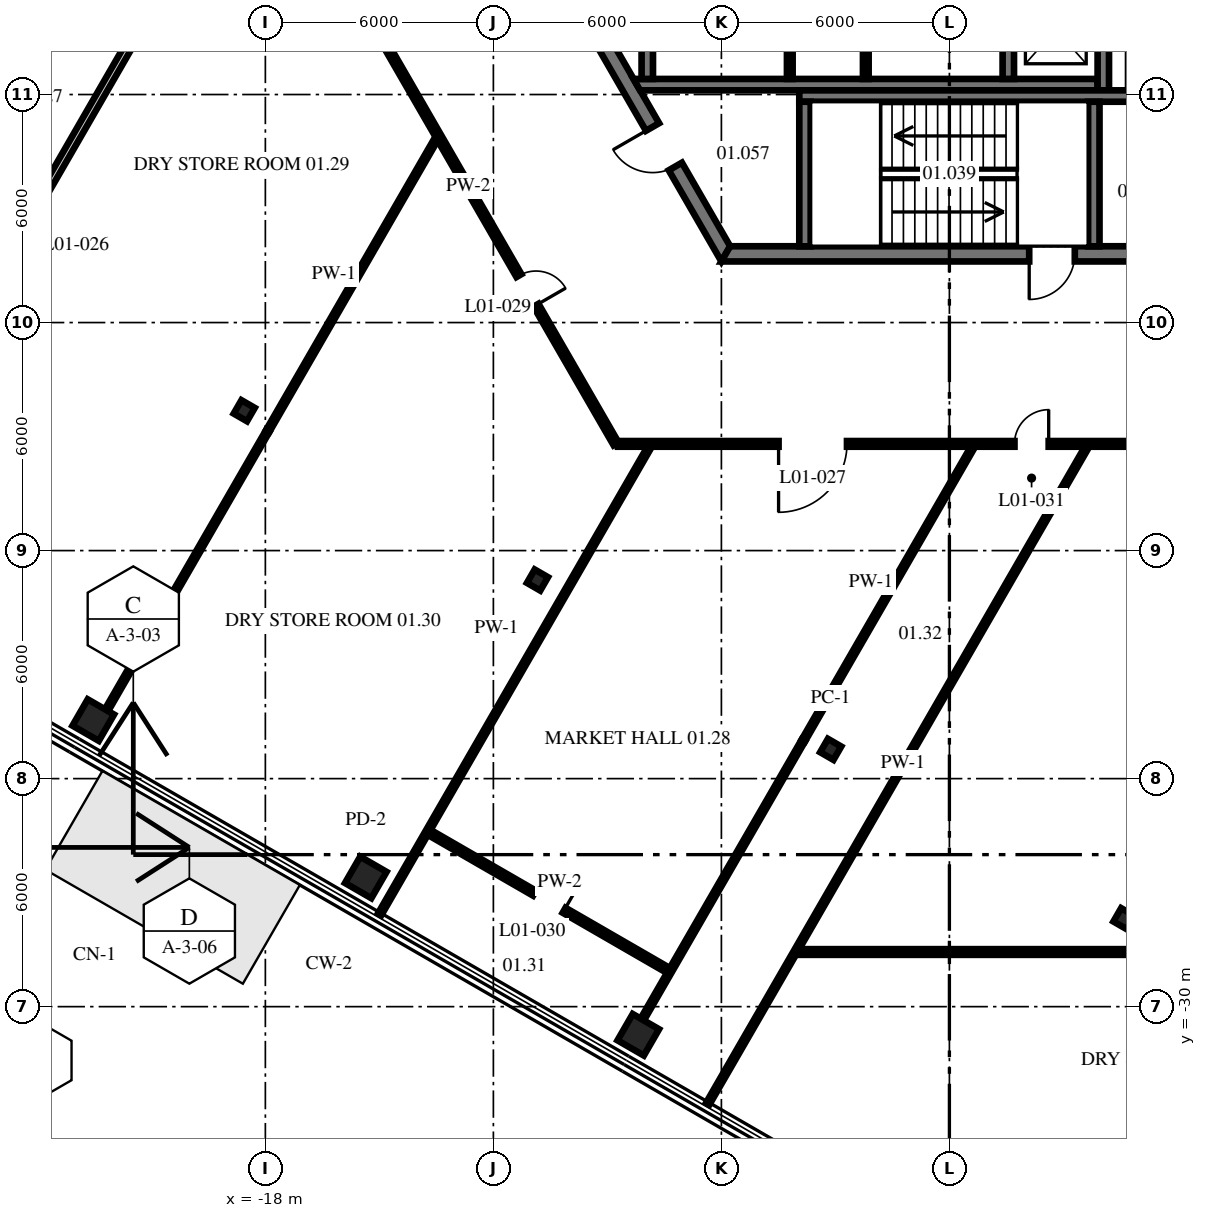
"""IFC4 building model, lengths in metres.
Left out: names, types, materials, properties, quantities, classifications, styles, units other than length and angle.
Written with IfcOpenShell. Run it as: python <this file> out.ifc"""

import sys

from ifc_helpers import new_model, si_unit, direction, frame, frame_2d, origin, origin_2d, place, context, subcontext, project, spatial, polyline, rectangle, i_section, outline, extrude, source, transform, mapped, element, fill, save


model = new_model("IFC4")
c1 = context("Model", 3, precision=1e-05, world=origin(), true_north=direction((0.0, 1.0)))
c2 = subcontext(c1, "Body", "Model", "MODEL_VIEW")
j1 = project(units=[si_unit("LENGTHUNIT", "METRE"), si_unit("PLANEANGLEUNIT", "RADIAN")], contexts=[c1])
p1 = place(None, origin())
s1 = spatial("IfcSite", under=j1, at=p1, CompositionType="ELEMENT")
p2 = place(p1, origin())
s2 = spatial("IfcBuilding", under=s1, at=p2, CompositionType="ELEMENT")
p3 = place(p2, frame((0.0, 0.0, 7.0)))
s3 = spatial("IfcBuildingStorey", under=s2, at=p3, CompositionType="ELEMENT", Elevation=7.0)
m1 = source(origin(), c2, "Body", "SweptSolid", [
    extrude(i_section(OverallWidth=0.404, OverallDepth=0.406, WebThickness=0.027, FlangeThickness=0.044, at=origin_2d()), origin(), (0.0, 0.0, 1.0), 4.5),
])
for number, where, z_axis, x_axis in (
    (1, (-18.556, -14.32, 0.0), (0.0, 0.0, 1.0), (0.866, -0.5, 0.0)),
    (2, (-10.84, -18.775, 0.0), (0.0, 0.0, 1.0), (0.866, -0.5, 0.0)),
    (3, (-3.124, -23.23, 0.0), (0.0, 0.0, 1.0), (0.866, -0.5, 0.0)),
    (4, (4.593, -27.685, 0.0), (0.0, 0.0, 1.0), (0.866, -0.5, 0.0)),
):
    element("IfcColumn", number, at=place(p3, frame(where, z_axis=z_axis, x_axis=x_axis)), inside=s3, PredefinedType="COLUMN", context=c2, shape_type="MappedRepresentation", body=[
        mapped(m1, transform((0.0, 0.0, 0.0), scale=1.0)),
    ])
m2 = source(origin(), c2, "Body", "SweptSolid", [
    extrude(rectangle(XDim=0.8, YDim=0.8, at=origin_2d()), origin(), (0.0, 0.0, 1.0), 4.5),
])
for number, where, z_axis, x_axis in (
    (5, (-22.528, -22.46, 0.0), (0.0, 0.0, 1.0), (0.866, -0.5, 0.0)),
    (6, (-15.358, -26.6, 0.0), (0.0, 0.0, 1.0), (0.866, -0.5, 0.0)),
    (7, (-8.187, -30.74, 0.0), (0.0, 0.0, 1.0), (0.866, -0.5, 0.0)),
):
    element("IfcColumn", number, at=place(p3, frame(where, z_axis=z_axis, x_axis=x_axis)), inside=s3, PredefinedType="COLUMN", context=c2, shape_type="MappedRepresentation", body=[
        mapped(m2, transform((0.0, 0.0, 0.0), scale=1.0)),
    ])
m3 = source(origin(), c2, "Body", "SweptSolid", [
    extrude(outline(polyline([(-0.115, -0.2), (11.885, -0.2), (11.654, 0.2), (0.115, 0.2), (-0.115, -0.2)])), origin(), (0.0, 0.0, 1.0), 4.3),
])
p4 = place(p3, frame((-11.769, 0.0, 0.0), z_axis=(0.0, 0.0, 1.0), x_axis=(0.499996592174, -0.866027371285, 0.0)))
e8 = element("IfcWall", 8, at=p4, inside=s3, PredefinedType="SHEAR", context=c2, shape_type="MappedRepresentation", body=[
    mapped(m3, transform((0.0, 0.0, 0.0), scale=1.0)),
])
p5 = place(p4, frame((1.405, 0.0, 0.0)))
e9 = element("IfcOpeningElement", 9, at=p5, cuts=e8, PredefinedType="OPENING", context=c2, shape_type="SweptSolid", body=[
    extrude(rectangle(XDim=1.8, YDim=2.1, at=frame_2d((0.9, 1.05))), frame((0.0, 0.21, 0.0), z_axis=(0.0, -1.0, 0.0), x_axis=(1.0, 0.0, 0.0)), (0.0, 0.0, 1.0), 0.42),
])
p6 = place(p4, frame((7.915, 0.0, 0.0)))
e10 = element("IfcOpeningElement", 10, at=p6, cuts=e8, PredefinedType="OPENING", context=c2, shape_type="SweptSolid", body=[
    extrude(rectangle(XDim=1.2, YDim=2.1, at=frame_2d((0.6, 1.05))), frame((0.0, 0.21, 0.0), z_axis=(0.0, -1.0, 0.0), x_axis=(1.0, 0.0, 0.0)), (0.0, 0.0, 1.0), 0.42),
])
p7 = place(p3, frame((-5.885, -10.192, 0.0), z_axis=(0.0, 0.0, 1.0), x_axis=(1.0, 0.0, 0.0)))
e11 = element("IfcWall", 11, at=p7, inside=s3, PredefinedType="SHEAR", context=c2, shape_type="MappedRepresentation", body=[
    mapped(m3, transform((0.0, 0.0, 0.0), scale=1.0)),
])
p8 = place(p7, frame((7.985, 0.0, 0.0)))
e12 = element("IfcOpeningElement", 12, at=p8, cuts=e11, PredefinedType="OPENING", context=c2, shape_type="SweptSolid", body=[
    extrude(rectangle(XDim=1.2, YDim=2.1, at=frame_2d((0.6, 1.05))), frame((0.0, 0.21, 0.0), z_axis=(0.0, -1.0, 0.0), x_axis=(1.0, 0.0, 0.0)), (0.0, 0.0, 1.0), 0.42),
])
m4 = source(origin(), c2, "Body", "SweptSolid", [
    extrude(outline(polyline([(12.0, -0.15), (-0.04, -0.15), (-0.213, 0.15), (12.0, 0.15), (12.0, -0.15)])), origin(), (0.0, 0.0, 1.0), 4.3),
])
p9 = place(p3, frame((-8.1, -5.74, 0.0), z_axis=(0.0, 0.0, 1.0), x_axis=(1.0, 0.0, 0.0)))
e13 = element("IfcWall", 13, at=p9, inside=s3, PredefinedType="SHEAR", context=c2, shape_type="MappedRepresentation", body=[
    mapped(m4, transform((0.0, 0.0, 0.0), scale=1.0)),
])
m5 = source(origin(), c2, "Body", "SweptSolid", [
    extrude(rectangle(XDim=2.2, YDim=0.3, at=frame_2d((1.1, 0.0))), origin(), (0.0, 0.0, 1.0), 4.3),
])
for number, where, z_axis, x_axis in (
    (14, (-7.95, -5.59, 0.0), (0.0, 0.0, 1.0), (0.0, 1.0, 0.0)),
    (15, (1.55, -5.59, 0.0), (0.0, 0.0, 1.0), (0.0, 1.0, 0.0)),
):
    element("IfcWall", number, at=place(p3, frame(where, z_axis=z_axis, x_axis=x_axis)), inside=s3, PredefinedType="SHEAR", context=c2, shape_type="MappedRepresentation", body=[
        mapped(m5, transform((0.0, 0.0, 0.0), scale=1.0)),
    ])
m6 = source(origin(), c2, "Body", "SweptSolid", [
    extrude(rectangle(XDim=2.5, YDim=0.3, at=frame_2d((1.25, 0.0))), origin(), (0.0, 0.0, 1.0), 4.3),
])
p10 = place(p3, frame((4.05, -5.89, 0.0), z_axis=(0.0, 0.0, 1.0), x_axis=(0.0, 1.0, 0.0)))
e16 = element("IfcWall", 16, at=p10, inside=s3, PredefinedType="SHEAR", context=c2, shape_type="MappedRepresentation", body=[
    mapped(m6, transform((0.0, 0.0, 0.0), scale=1.0)),
])
m7 = source(origin(), c2, "Body", "SweptSolid", [
    extrude(outline(polyline([(0.0, -0.15), (8.95, -0.15), (8.65, 0.15), (0.0, 0.15), (0.0, -0.15)])), origin(), (0.0, 0.0, 1.0), 4.3),
])
p11 = place(p3, frame((-3.95, -6.04, 0.0), z_axis=(0.0, 0.0, 1.0), x_axis=(1.0, 0.0, 0.0)))
e17 = element("IfcWall", 17, at=p11, inside=s3, PredefinedType="SHEAR", context=c2, shape_type="MappedRepresentation", body=[
    mapped(m7, transform((0.0, 0.0, 0.0), scale=1.0)),
])
m8 = source(origin(), c2, "Body", "SweptSolid", [
    extrude(outline(polyline([(3.8, -0.15), (-0.004, -0.15), (-0.004, 0.15), (3.8, 0.15), (3.8, -0.15)])), origin(), (0.0, 0.0, 1.0), 4.3),
])
for number, where, z_axis, x_axis in (
    (18, (-3.8, -9.99, 0.0), (0.0, 0.0, 1.0), (0.0, 1.0, 0.0)),
    (19, (3.8, -9.99, 0.0), (0.0, 0.0, 1.0), (0.0, 1.0, 0.0)),
):
    element("IfcWall", number, at=place(p3, frame(where, z_axis=z_axis, x_axis=x_axis)), inside=s3, PredefinedType="SHEAR", context=c2, shape_type="MappedRepresentation", body=[
        mapped(m8, transform((0.0, 0.0, 0.0), scale=1.0)),
    ])
m9 = source(origin(), c2, "Body", "SweptSolid", [
    extrude(rectangle(XDim=2.2, YDim=0.15, at=frame_2d((1.1, 0.0))), origin(), (0.0, 0.0, 1.0), 4.3),
])
for number, where, z_axis, x_axis in (
    (20, (-4.2, -5.59, 0.0), (0.0, 0.0, 1.0), (0.0, 1.0, 0.0)),
    (21, (-2.2, -5.59, 0.0), (0.0, 0.0, 1.0), (0.0, 1.0, 0.0)),
):
    element("IfcWall", number, at=place(p3, frame(where, z_axis=z_axis, x_axis=x_axis)), inside=s3, PredefinedType="PARTITIONING", context=c2, shape_type="MappedRepresentation", body=[
        mapped(m9, transform((0.0, 0.0, 0.0), scale=1.0)),
    ])
p12 = place(p3, frame((-17.542, 0.0, 0.0), z_axis=(0.0, 0.0, 1.0), x_axis=(0.499996320153, -0.866027528335, 0.0)))
e22 = element("IfcWall", 22, at=p12, inside=s3, PredefinedType="PARTITIONING", context=c2, shape_type="SweptSolid", body=[
    extrude(rectangle(XDim=17.543, YDim=0.15, at=frame_2d((8.771, 0.0))), origin(), (0.0, 0.0, 1.0), 4.3),
])
p13 = place(p12, frame((3.65, 0.0, 0.0)))
e23 = element("IfcOpeningElement", 23, at=p13, cuts=e22, PredefinedType="OPENING", context=c2, shape_type="SweptSolid", body=[
    extrude(rectangle(XDim=0.9, YDim=2.1, at=frame_2d((0.45, 1.05))), frame((0.0, 0.085, 0.0), z_axis=(0.0, -1.0, 0.0), x_axis=(1.0, 0.0, 0.0)), (0.0, 0.0, 1.0), 0.17),
])
p14 = place(p12, frame((12.43, 0.0, 0.0)))
e24 = element("IfcOpeningElement", 24, at=p14, cuts=e22, PredefinedType="OPENING", context=c2, shape_type="SweptSolid", body=[
    extrude(rectangle(XDim=0.9, YDim=2.1, at=frame_2d((0.45, 1.05))), frame((0.0, 0.085, 0.0), z_axis=(0.0, -1.0, 0.0), x_axis=(1.0, 0.0, 0.0)), (0.0, 0.0, 1.0), 0.17),
])
m10 = source(origin(), c2, "Body", "SweptSolid", [
    extrude(rectangle(XDim=7.308, YDim=0.15, at=frame_2d((3.654, 0.0))), origin(), (0.0, 0.0, 1.0), 4.3),
])
p15 = place(p3, frame((-13.707, -25.405, 0.0), z_axis=(0.0, 0.0, 1.0), x_axis=(0.866020355572, -0.500008743658, 0.0)))
e25 = element("IfcWall", 25, at=p15, inside=s3, PredefinedType="PARTITIONING", context=c2, shape_type="MappedRepresentation", body=[
    mapped(m10, transform((0.0, 0.0, 0.0), scale=1.0)),
])
p16 = place(p15, frame((3.22, 0.0, 0.0)))
e26 = element("IfcOpeningElement", 26, at=p16, cuts=e25, PredefinedType="OPENING", context=c2, shape_type="SweptSolid", body=[
    extrude(rectangle(XDim=0.9, YDim=2.1, at=frame_2d((0.45, 1.05))), frame((0.0, 0.085, 0.0), z_axis=(0.0, -1.0, 0.0), x_axis=(1.0, 0.0, 0.0)), (0.0, 0.0, 1.0), 0.17),
])
p17 = place(p3, frame((-3.974, -28.562, 0.0), z_axis=(0.0, 0.0, 1.0), x_axis=(1.0, 0.0, 0.0)))
e27 = element("IfcWall", 27, at=p17, inside=s3, PredefinedType="PARTITIONING", context=c2, shape_type="SweptSolid", body=[
    extrude(rectangle(XDim=19.328, YDim=0.15, at=frame_2d((9.664, 0.0))), origin(), (0.0, 0.0, 1.0), 4.3),
])
p18 = place(p17, frame((9.17, 0.0, 0.0)))
e28 = element("IfcOpeningElement", 28, at=p18, cuts=e27, PredefinedType="OPENING", context=c2, shape_type="SweptSolid", body=[
    extrude(rectangle(XDim=0.9, YDim=2.1, at=frame_2d((0.45, 1.05))), frame((0.0, 0.085, 0.0), z_axis=(0.0, -1.0, 0.0), x_axis=(1.0, 0.0, 0.0)), (0.0, 0.0, 1.0), 0.17),
])
p19 = place(p3, frame((-8.721, -15.192, 0.0), z_axis=(0.0, 0.0, 1.0), x_axis=(1.0, 0.0, 0.0)))
e29 = element("IfcWall", 29, at=p19, inside=s3, PredefinedType="PARTITIONING", context=c2, shape_type="SweptSolid", body=[
    extrude(rectangle(XDim=17.451, YDim=0.15, at=frame_2d((8.725, 0.0))), origin(), (0.0, 0.0, 1.0), 4.3),
])
p20 = place(p19, frame((4.226, 0.0, 0.0)))
e30 = element("IfcOpeningElement", 30, at=p20, cuts=e29, PredefinedType="OPENING", context=c2, shape_type="SweptSolid", body=[
    extrude(rectangle(XDim=1.8, YDim=2.4, at=frame_2d((0.9, 1.2))), frame((0.0, 0.085, 0.0), z_axis=(0.0, -1.0, 0.0), x_axis=(1.0, 0.0, 0.0)), (0.0, 0.0, 1.0), 0.17),
])
p21 = place(p19, frame((10.434, 0.0, 0.0)))
e31 = element("IfcOpeningElement", 31, at=p21, cuts=e29, PredefinedType="OPENING", context=c2, shape_type="SweptSolid", body=[
    extrude(rectangle(XDim=0.9, YDim=2.1, at=frame_2d((0.45, 1.05))), frame((0.0, 0.085, 0.0), z_axis=(0.0, -1.0, 0.0), x_axis=(1.0, 0.0, 0.0)), (0.0, 0.0, 1.0), 0.17),
])
p22 = place(p19, frame((14.536, 0.0, 0.0)))
e32 = element("IfcOpeningElement", 32, at=p22, cuts=e29, PredefinedType="OPENING", context=c2, shape_type="SweptSolid", body=[
    extrude(rectangle(XDim=0.9, YDim=2.1, at=frame_2d((0.45, 1.05))), frame((0.0, 0.085, 0.0), z_axis=(0.0, -1.0, 0.0), x_axis=(1.0, 0.0, 0.0)), (0.0, 0.0, 1.0), 0.17),
])
m11 = source(origin(), c2, "Body", "SweptSolid", [
    extrude(rectangle(XDim=20.055, YDim=0.1, at=frame_2d((10.027, 0.0))), origin(), (0.0, 0.0, 1.0), 4.3),
])
p23 = place(p3, frame((-6.363, -32.56, 0.0), z_axis=(0.0, 0.0, 1.0), x_axis=(0.499993625742, 0.866029083933, 0.0)))
e33 = element("IfcWall", 33, at=p23, inside=s3, PredefinedType="PARTITIONING", context=c2, shape_type="MappedRepresentation", body=[
    mapped(m11, transform((0.0, 0.0, 0.0), scale=1.0)),
])
m12 = source(origin(), c2, "Body", "SweptSolid", [
    extrude(rectangle(XDim=8.491, YDim=0.1, at=frame_2d((4.245, 0.0))), origin(), (0.0, 0.0, 1.0), 3.528),
])
p24 = place(p3, frame((-8.087, -30.347, 0.0), z_axis=(0.0, 0.0, 1.0), x_axis=(0.499995411839, 0.866028052744, 0.0)))
e34 = element("IfcWall", 34, at=p24, inside=s3, PredefinedType="PARTITIONING", context=c2, shape_type="MappedRepresentation", body=[
    mapped(m12, transform((0.0, 0.0, 0.0), scale=1.0)),
])
p25 = place(p3, frame((-3.842, -22.994, 0.0), z_axis=(0.0, 0.0, 1.0), x_axis=(0.499992224644, 0.866029892842, 0.0)))
e35 = element("IfcWall", 35, at=p25, inside=s3, PredefinedType="PARTITIONING", context=c2, shape_type="SweptSolid", body=[
    extrude(rectangle(XDim=9.009, YDim=0.1, at=frame_2d((4.504, 0.0))), origin(), (0.0, 0.0, 1.0), 4.3),
])
m13 = source(origin(), c2, "Body", "SweptSolid", [
    extrude(rectangle(XDim=14.21, YDim=0.1, at=frame_2d((7.105, 0.0))), origin(), (0.0, 0.0, 1.0), 4.3),
])
p26 = place(p3, frame((-14.995, -27.576, 0.0), z_axis=(0.0, 0.0, 1.0), x_axis=(0.500008500586, 0.866020495913, 0.0)))
e36 = element("IfcWall", 36, at=p26, inside=s3, PredefinedType="PARTITIONING", context=c2, shape_type="MappedRepresentation", body=[
    mapped(m13, transform((0.0, 0.0, 0.0), scale=1.0)),
])
m14 = source(origin(), c2, "Body", "SweptSolid", [
    extrude(rectangle(XDim=8.49, YDim=0.1, at=frame_2d((4.245, 0.0))), origin(), (0.0, 0.0, 1.0), 3.528),
])
p27 = place(p3, frame((-22.184, -22.208, 0.0), z_axis=(0.0, 0.0, 1.0), x_axis=(0.500007862672, 0.866020864221, 0.0)))
e37 = element("IfcWall", 37, at=p27, inside=s3, PredefinedType="PARTITIONING", context=c2, shape_type="MappedRepresentation", body=[
    mapped(m14, transform((0.0, 0.0, 0.0), scale=1.0)),
])
p28 = place(p3, frame((-17.939, -14.855, 0.0), z_axis=(0.0, 0.0, 1.0), x_axis=(0.500002384187, 0.866024027269, 0.0)))
e38 = element("IfcWall", 38, at=p28, inside=s3, PredefinedType="PARTITIONING", context=c2, shape_type="SweptSolid", body=[
    extrude(rectangle(XDim=8.883, YDim=0.1, at=frame_2d((4.442, 0.0))), origin(), (0.0, 0.0, 1.0), 4.3),
])
p29 = place(p3, frame((-29.313, -18.092, 0.0), z_axis=(0.0, 0.0, 1.0), x_axis=(0.49999895657, 0.866026006208, 0.0)))
e39 = element("IfcWall", 39, at=p29, inside=s3, PredefinedType="PARTITIONING", context=c2, shape_type="SweptSolid", body=[
    extrude(rectangle(XDim=20.891, YDim=0.2, at=frame_2d((10.446, 0.0))), origin(), (0.0, 0.0, 1.0), 4.3),
])
p30 = place(p29, frame((9.441, 0.0, 0.0)))
e40 = element("IfcOpeningElement", 40, at=p30, cuts=e39, PredefinedType="OPENING", context=c2, shape_type="SweptSolid", body=[
    extrude(rectangle(XDim=0.9, YDim=2.1, at=frame_2d((0.45, 1.05))), frame((0.0, 0.11, 0.0), z_axis=(0.0, -1.0, 0.0), x_axis=(1.0, 0.0, 0.0)), (0.0, 0.0, 1.0), 0.22),
])
p31 = place(p8, frame((1.2, 0.0, 0.0), z_axis=(0.0, 0.0, 1.0), x_axis=(-1.0, 0.0, 0.0)))
e41 = element("IfcDoor", 41, at=p31, inside=s3, OperationType="SINGLE_SWING_RIGHT", PredefinedType="DOOR", context=c2, shape_type="SweptSolid", body=[
    extrude(rectangle(XDim=1.2, YDim=2.1, at=frame_2d((0.6, 1.05))), frame((0.0, 0.025, 0.0), z_axis=(0.0, -1.0, 0.0), x_axis=(1.0, 0.0, 0.0)), (0.0, 0.0, 1.0), 0.05),
])
fill(e12, e41)
p32 = place(p6, frame((1.2, 0.0, 0.0), z_axis=(0.0, 0.0, 1.0), x_axis=(-1.0, 0.0, 0.0)))
e42 = element("IfcDoor", 42, at=p32, inside=s3, OperationType="SINGLE_SWING_RIGHT", PredefinedType="DOOR", context=c2, shape_type="SweptSolid", body=[
    extrude(rectangle(XDim=1.2, YDim=2.1, at=frame_2d((0.6, 1.05))), frame((0.0, 0.025, 0.0), z_axis=(0.0, -1.0, 0.0), x_axis=(1.0, 0.0, 0.0)), (0.0, 0.0, 1.0), 0.05),
])
fill(e10, e42)
p33 = place(p20, origin())
e43 = element("IfcDoor", 43, at=p33, inside=s3, OperationType="DOUBLE_DOOR_SINGLE_SWING", PredefinedType="DOOR", context=c2, shape_type="SweptSolid", body=[
    extrude(rectangle(XDim=1.8, YDim=2.4, at=frame_2d((0.9, 1.2))), frame((0.0, 0.025, 0.0), z_axis=(0.0, -1.0, 0.0), x_axis=(1.0, 0.0, 0.0)), (0.0, 0.0, 1.0), 0.05),
])
fill(e30, e43)
p34 = place(p14, origin())
e44 = element("IfcDoor", 44, at=p34, inside=s3, OperationType="SINGLE_SWING_LEFT", PredefinedType="DOOR", context=c2, shape_type="SweptSolid", body=[
    extrude(rectangle(XDim=0.9, YDim=2.1, at=frame_2d((0.45, 1.05))), frame((0.0, 0.025, 0.0), z_axis=(0.0, -1.0, 0.0), x_axis=(1.0, 0.0, 0.0)), (0.0, 0.0, 1.0), 0.05),
])
fill(e24, e44)
p35 = place(p16, origin())
e45 = element("IfcDoor", 45, at=p35, inside=s3, OperationType="SINGLE_SWING_LEFT", PredefinedType="DOOR", context=c2, shape_type="SweptSolid", body=[
    extrude(rectangle(XDim=0.9, YDim=2.1, at=frame_2d((0.45, 1.05))), frame((0.0, 0.025, 0.0), z_axis=(0.0, -1.0, 0.0), x_axis=(1.0, 0.0, 0.0)), (0.0, 0.0, 1.0), 0.05),
])
fill(e26, e45)
p36 = place(p21, origin())
e46 = element("IfcDoor", 46, at=p36, inside=s3, OperationType="SINGLE_SWING_LEFT", PredefinedType="DOOR", context=c2, shape_type="SweptSolid", body=[
    extrude(rectangle(XDim=0.9, YDim=2.1, at=frame_2d((0.45, 1.05))), frame((0.0, 0.025, 0.0), z_axis=(0.0, -1.0, 0.0), x_axis=(1.0, 0.0, 0.0)), (0.0, 0.0, 1.0), 0.05),
])
fill(e31, e46)
save(model, sys.argv[1])
